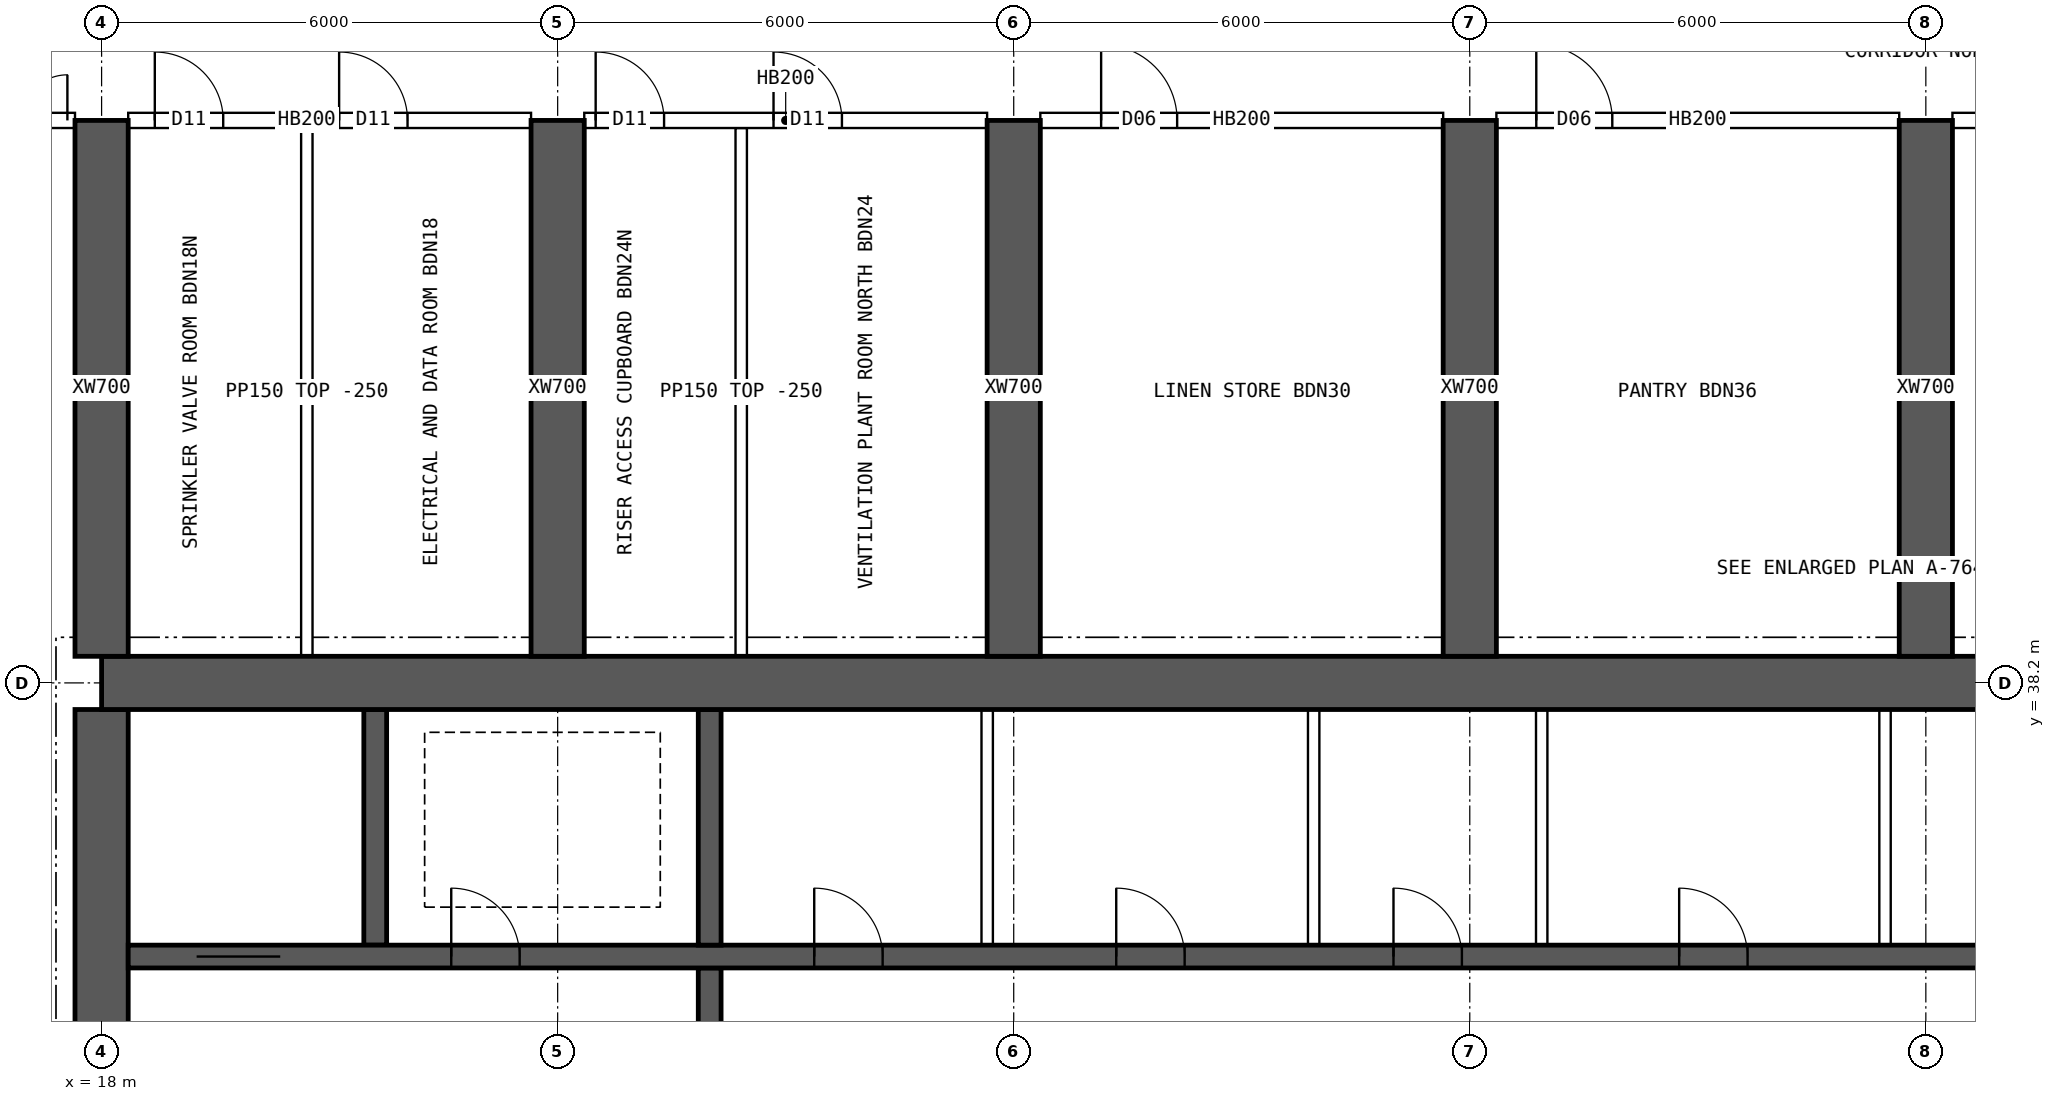
"""IFC4 building model, lengths in metres.
Left out: names, types, materials, properties, quantities, classifications, styles, units other than length and angle.
Written with IfcOpenShell. Run it as: python <this file> out.ifc"""

import sys

from ifc_helpers import new_model, si_unit, direction, frame, frame_2d, origin, place, context, subcontext, project, spatial, rectangle, extrude, element, fill, save


model = new_model("IFC4")
c1 = context("Model", 3, precision=1e-05, world=origin(), true_north=direction((0.0, 1.0)))
c2 = subcontext(c1, "Body", "Model", "MODEL_VIEW")
j1 = project(units=[si_unit("LENGTHUNIT", "METRE"), si_unit("PLANEANGLEUNIT", "RADIAN")], contexts=[c1])
p1 = place(None, origin())
s1 = spatial("IfcSite", under=j1, at=p1, CompositionType="ELEMENT")
p2 = place(p1, origin())
s2 = spatial("IfcBuilding", under=s1, at=p2, CompositionType="ELEMENT")
p3 = place(p2, frame((0.0, 0.0, 246.55)))
s3 = spatial("IfcBuildingStorey", under=s2, at=p3, CompositionType="ELEMENT", Elevation=246.55)
p4 = place(p3, frame((18.0, 38.2, 0.0), z_axis=(0.0, 0.0, 1.0), x_axis=(1.0, 0.0, 0.0)))
e1 = element("IfcWall", 1, at=p4, inside=s3, PredefinedType="SHEAR", context=c2, shape_type="SweptSolid", body=[
    extrude(rectangle(XDim=48.0, YDim=0.7, at=frame_2d((24.0, 0.0))), origin(), (0.0, 0.0, 1.0), 3.75),
])
p5 = place(p3, frame((18.0, 26.15, 0.0), z_axis=(0.0, 0.0, 1.0), x_axis=(0.0, 1.0, 0.0)))
e2 = element("IfcWall", 2, at=p5, inside=s3, PredefinedType="SHEAR", context=c2, shape_type="SweptSolid", body=[
    extrude(rectangle(XDim=11.7, YDim=0.7, at=frame_2d((5.85, 0.0))), origin(), (0.0, 0.0, 1.0), 3.75),
])
p6 = place(p5, frame((5.15, 0.0, 0.0)))
e3 = element("IfcOpeningElement", 3, at=p6, cuts=e2, PredefinedType="OPENING", context=c2, shape_type="SweptSolid", body=[
    extrude(rectangle(XDim=1.2, YDim=2.1, at=frame_2d((0.6, 1.05))), frame((0.0, 0.36, 0.0), z_axis=(0.0, -1.0, 0.0), x_axis=(1.0, 0.0, 0.0)), (0.0, 0.0, 1.0), 0.72),
])
p7 = place(p3, frame((18.35, 34.6, 0.0), z_axis=(0.0, 0.0, 1.0), x_axis=(1.0, 0.0, 0.0)))
e4 = element("IfcWall", 4, at=p7, inside=s3, PredefinedType="SHEAR", context=c2, shape_type="SweptSolid", body=[
    extrude(rectangle(XDim=47.3, YDim=0.3, at=frame_2d((23.65, 0.0))), origin(), (0.0, 0.0, 1.0), 3.75),
])
p8 = place(p7, frame((0.9, 0.0, 0.0)))
e5 = element("IfcOpeningElement", 5, at=p8, cuts=e4, PredefinedType="OPENING", context=c2, shape_type="SweptSolid", body=[
    extrude(rectangle(XDim=1.1, YDim=2.1, at=frame_2d((0.55, 1.05))), frame((0.0, 0.16, 0.0), z_axis=(0.0, -1.0, 0.0), x_axis=(1.0, 0.0, 0.0)), (0.0, 0.0, 1.0), 0.32),
])
p9 = place(p7, frame((45.3, 0.0, 0.0)))
e6 = element("IfcOpeningElement", 6, at=p9, cuts=e4, PredefinedType="OPENING", context=c2, shape_type="SweptSolid", body=[
    extrude(rectangle(XDim=1.1, YDim=2.1, at=frame_2d((0.55, 1.05))), frame((0.0, 0.16, 0.0), z_axis=(0.0, -1.0, 0.0), x_axis=(1.0, 0.0, 0.0)), (0.0, 0.0, 1.0), 0.32),
])
p10 = place(p7, frame((4.25, 0.0, 0.0)))
e7 = element("IfcOpeningElement", 7, at=p10, cuts=e4, PredefinedType="OPENING", context=c2, shape_type="SweptSolid", body=[
    extrude(rectangle(XDim=0.9, YDim=2.1, at=frame_2d((0.45, 1.05))), frame((0.0, 0.16, 0.0), z_axis=(0.0, -1.0, 0.0), x_axis=(1.0, 0.0, 0.0)), (0.0, 0.0, 1.0), 0.32),
])
p11 = place(p7, frame((42.15, 0.0, 0.0)))
e8 = element("IfcOpeningElement", 8, at=p11, cuts=e4, PredefinedType="OPENING", context=c2, shape_type="SweptSolid", body=[
    extrude(rectangle(XDim=0.9, YDim=2.1, at=frame_2d((0.45, 1.05))), frame((0.0, 0.16, 0.0), z_axis=(0.0, -1.0, 0.0), x_axis=(1.0, 0.0, 0.0)), (0.0, 0.0, 1.0), 0.32),
])
p12 = place(p7, frame((9.025, 0.0, 0.0)))
e9 = element("IfcOpeningElement", 9, at=p12, cuts=e4, PredefinedType="OPENING", context=c2, shape_type="SweptSolid", body=[
    extrude(rectangle(XDim=0.9, YDim=2.1, at=frame_2d((0.45, 1.05))), frame((0.0, 0.16, 0.0), z_axis=(0.0, -1.0, 0.0), x_axis=(1.0, 0.0, 0.0)), (0.0, 0.0, 1.0), 0.32),
])
p13 = place(p7, frame((12.999, 0.0, 0.0)))
e10 = element("IfcOpeningElement", 10, at=p13, cuts=e4, PredefinedType="OPENING", context=c2, shape_type="SweptSolid", body=[
    extrude(rectangle(XDim=0.9, YDim=2.1, at=frame_2d((0.45, 1.05))), frame((0.0, 0.16, 0.0), z_axis=(0.0, -1.0, 0.0), x_axis=(1.0, 0.0, 0.0)), (0.0, 0.0, 1.0), 0.32),
])
p14 = place(p7, frame((16.646, 0.0, 0.0)))
e11 = element("IfcOpeningElement", 11, at=p14, cuts=e4, PredefinedType="OPENING", context=c2, shape_type="SweptSolid", body=[
    extrude(rectangle(XDim=0.9, YDim=2.1, at=frame_2d((0.45, 1.05))), frame((0.0, 0.16, 0.0), z_axis=(0.0, -1.0, 0.0), x_axis=(1.0, 0.0, 0.0)), (0.0, 0.0, 1.0), 0.32),
])
p15 = place(p7, frame((20.405, 0.0, 0.0)))
e12 = element("IfcOpeningElement", 12, at=p15, cuts=e4, PredefinedType="OPENING", context=c2, shape_type="SweptSolid", body=[
    extrude(rectangle(XDim=0.9, YDim=2.1, at=frame_2d((0.45, 1.05))), frame((0.0, 0.16, 0.0), z_axis=(0.0, -1.0, 0.0), x_axis=(1.0, 0.0, 0.0)), (0.0, 0.0, 1.0), 0.32),
])
p16 = place(p7, frame((24.811, 0.0, 0.0)))
e13 = element("IfcOpeningElement", 13, at=p16, cuts=e4, PredefinedType="OPENING", context=c2, shape_type="SweptSolid", body=[
    extrude(rectangle(XDim=0.9, YDim=2.1, at=frame_2d((0.45, 1.05))), frame((0.0, 0.16, 0.0), z_axis=(0.0, -1.0, 0.0), x_axis=(1.0, 0.0, 0.0)), (0.0, 0.0, 1.0), 0.32),
])
p17 = place(p7, frame((27.608, 0.0, 0.0)))
e14 = element("IfcOpeningElement", 14, at=p17, cuts=e4, PredefinedType="OPENING", context=c2, shape_type="SweptSolid", body=[
    extrude(rectangle(XDim=0.9, YDim=2.1, at=frame_2d((0.45, 1.05))), frame((0.0, 0.16, 0.0), z_axis=(0.0, -1.0, 0.0), x_axis=(1.0, 0.0, 0.0)), (0.0, 0.0, 1.0), 0.32),
])
p18 = place(p7, frame((29.778, 0.0, 0.0)))
e15 = element("IfcOpeningElement", 15, at=p18, cuts=e4, PredefinedType="OPENING", context=c2, shape_type="SweptSolid", body=[
    extrude(rectangle(XDim=0.9, YDim=2.1, at=frame_2d((0.45, 1.05))), frame((0.0, 0.16, 0.0), z_axis=(0.0, -1.0, 0.0), x_axis=(1.0, 0.0, 0.0)), (0.0, 0.0, 1.0), 0.32),
])
p19 = place(p7, frame((33.577, 0.0, 0.0)))
e16 = element("IfcOpeningElement", 16, at=p19, cuts=e4, PredefinedType="OPENING", context=c2, shape_type="SweptSolid", body=[
    extrude(rectangle(XDim=0.9, YDim=2.1, at=frame_2d((0.45, 1.05))), frame((0.0, 0.16, 0.0), z_axis=(0.0, -1.0, 0.0), x_axis=(1.0, 0.0, 0.0)), (0.0, 0.0, 1.0), 0.32),
])
p20 = place(p7, frame((37.528, 0.0, 0.0)))
e17 = element("IfcOpeningElement", 17, at=p20, cuts=e4, PredefinedType="OPENING", context=c2, shape_type="SweptSolid", body=[
    extrude(rectangle(XDim=0.9, YDim=2.1, at=frame_2d((0.45, 1.05))), frame((0.0, 0.16, 0.0), z_axis=(0.0, -1.0, 0.0), x_axis=(1.0, 0.0, 0.0)), (0.0, 0.0, 1.0), 0.32),
])
p21 = place(p3, frame((26.0, 30.55, 0.0), z_axis=(0.0, 0.0, 1.0), x_axis=(0.0, 1.0, 0.0)))
e18 = element("IfcWall", 18, at=p21, inside=s3, PredefinedType="SHEAR", context=c2, shape_type="SweptSolid", body=[
    extrude(rectangle(XDim=3.9, YDim=0.3, at=frame_2d((1.95, 0.0))), origin(), (0.0, 0.0, 1.0), 3.75),
])
p22 = place(p21, frame((1.4, 0.0, 0.0)))
e19 = element("IfcOpeningElement", 19, at=p22, cuts=e18, PredefinedType="OPENING", context=c2, shape_type="SweptSolid", body=[
    extrude(rectangle(XDim=1.2, YDim=2.1, at=frame_2d((0.6, 1.05))), frame((0.0, 0.16, 0.0), z_axis=(0.0, -1.0, 0.0), x_axis=(1.0, 0.0, 0.0)), (0.0, 0.0, 1.0), 0.32),
])
for number, where, z_axis, x_axis in (
    (20, (21.6, 34.75, 0.0), (0.0, 0.0, 1.0), (0.0, 1.0, 0.0)),
    (21, (26.0, 34.75, 0.0), (0.0, 0.0, 1.0), (0.0, 1.0, 0.0)),
):
    element("IfcWall", number, at=place(p3, frame(where, z_axis=z_axis, x_axis=x_axis)), inside=s3, PredefinedType="SHEAR", context=c2, shape_type="SweptSolid", body=[
        extrude(rectangle(XDim=3.1, YDim=0.3, at=frame_2d((1.55, 0.0))), origin(), (0.0, 0.0, 1.0), 3.75),
    ])
for number, where, z_axis, x_axis in (
    (22, (18.0, 38.55, 0.0), (0.0, 0.0, 1.0), (0.0, 1.0, 0.0)),
    (23, (24.0, 38.55, 0.0), (0.0, 0.0, 1.0), (0.0, 1.0, 0.0)),
    (24, (30.0, 38.55, 0.0), (0.0, 0.0, 1.0), (0.0, 1.0, 0.0)),
    (25, (36.0, 38.55, 0.0), (0.0, 0.0, 1.0), (0.0, 1.0, 0.0)),
    (26, (42.0, 38.55, 0.0), (0.0, 0.0, 1.0), (0.0, 1.0, 0.0)),
):
    element("IfcWall", number, at=place(p3, frame(where, z_axis=z_axis, x_axis=x_axis)), inside=s3, PredefinedType="SHEAR", context=c2, shape_type="SweptSolid", body=[
        extrude(rectangle(XDim=7.05, YDim=0.7, at=frame_2d((3.525, 0.0))), origin(), (0.0, 0.0, 1.0), 3.75),
    ])
for number, where, z_axis, x_axis in (
    (27, (29.651, 34.75, 0.0), (0.0, 0.0, 1.0), (0.0, 1.0, 0.0)),
    (28, (33.946, 34.75, 0.0), (0.0, 0.0, 1.0), (0.0, 1.0, 0.0)),
    (29, (36.946, 34.75, 0.0), (0.0, 0.0, 1.0), (0.0, 1.0, 0.0)),
    (30, (41.463, 34.75, 0.0), (0.0, 0.0, 1.0), (0.0, 1.0, 0.0)),
):
    element("IfcWall", number, at=place(p3, frame(where, z_axis=z_axis, x_axis=x_axis)), inside=s3, PredefinedType="SOLIDWALL", context=c2, shape_type="SweptSolid", body=[
        extrude(rectangle(XDim=3.1, YDim=0.15, at=frame_2d((1.55, 0.0))), origin(), (0.0, 0.0, 1.0), 3.5),
    ])
p23 = place(p3, frame((15.6, 45.6, 0.0), z_axis=(0.0, 0.0, 1.0), x_axis=(1.0, 0.0, 0.0)))
e31 = element("IfcWall", 31, at=p23, inside=s3, PredefinedType="SOLIDWALL", context=c2, shape_type="SweptSolid", body=[
    extrude(rectangle(XDim=2.05, YDim=0.2, at=frame_2d((1.025, 0.0))), origin(), (0.0, 0.0, 1.0), 3.5),
])
p24 = place(p23, frame((0.75, 0.0, 0.0)))
e32 = element("IfcOpeningElement", 32, at=p24, cuts=e31, PredefinedType="OPENING", context=c2, shape_type="SweptSolid", body=[
    extrude(rectangle(XDim=1.2, YDim=2.1, at=frame_2d((0.6, 1.05))), frame((0.0, 0.11, 0.0), z_axis=(0.0, -1.0, 0.0), x_axis=(1.0, 0.0, 0.0)), (0.0, 0.0, 1.0), 0.22),
])
p25 = place(p3, frame((18.35, 45.6, 0.0), z_axis=(0.0, 0.0, 1.0), x_axis=(1.0, 0.0, 0.0)))
e33 = element("IfcWall", 33, at=p25, inside=s3, PredefinedType="SOLIDWALL", context=c2, shape_type="SweptSolid", body=[
    extrude(rectangle(XDim=5.3, YDim=0.2, at=frame_2d((2.65, 0.0))), origin(), (0.0, 0.0, 1.0), 3.5),
])
p26 = place(p25, frame((0.35, 0.0, 0.0)))
e34 = element("IfcOpeningElement", 34, at=p26, cuts=e33, PredefinedType="OPENING", context=c2, shape_type="SweptSolid", body=[
    extrude(rectangle(XDim=0.9, YDim=2.1, at=frame_2d((0.45, 1.05))), frame((0.0, 0.11, 0.0), z_axis=(0.0, -1.0, 0.0), x_axis=(1.0, 0.0, 0.0)), (0.0, 0.0, 1.0), 0.22),
])
p27 = place(p25, frame((2.775, 0.0, 0.0)))
e35 = element("IfcOpeningElement", 35, at=p27, cuts=e33, PredefinedType="OPENING", context=c2, shape_type="SweptSolid", body=[
    extrude(rectangle(XDim=0.9, YDim=2.1, at=frame_2d((0.45, 1.05))), frame((0.0, 0.11, 0.0), z_axis=(0.0, -1.0, 0.0), x_axis=(1.0, 0.0, 0.0)), (0.0, 0.0, 1.0), 0.22),
])
p28 = place(p3, frame((24.35, 45.6, 0.0), z_axis=(0.0, 0.0, 1.0), x_axis=(1.0, 0.0, 0.0)))
e36 = element("IfcWall", 36, at=p28, inside=s3, PredefinedType="SOLIDWALL", context=c2, shape_type="SweptSolid", body=[
    extrude(rectangle(XDim=5.3, YDim=0.2, at=frame_2d((2.65, 0.0))), origin(), (0.0, 0.0, 1.0), 3.5),
])
p29 = place(p28, frame((0.15, 0.0, 0.0)))
e37 = element("IfcOpeningElement", 37, at=p29, cuts=e36, PredefinedType="OPENING", context=c2, shape_type="SweptSolid", body=[
    extrude(rectangle(XDim=0.9, YDim=2.1, at=frame_2d((0.45, 1.05))), frame((0.0, 0.11, 0.0), z_axis=(0.0, -1.0, 0.0), x_axis=(1.0, 0.0, 0.0)), (0.0, 0.0, 1.0), 0.22),
])
p30 = place(p28, frame((2.49, 0.0, 0.0)))
e38 = element("IfcOpeningElement", 38, at=p30, cuts=e36, PredefinedType="OPENING", context=c2, shape_type="SweptSolid", body=[
    extrude(rectangle(XDim=0.9, YDim=2.1, at=frame_2d((0.45, 1.05))), frame((0.0, 0.11, 0.0), z_axis=(0.0, -1.0, 0.0), x_axis=(1.0, 0.0, 0.0)), (0.0, 0.0, 1.0), 0.22),
])
p31 = place(p3, frame((30.35, 45.6, 0.0), z_axis=(0.0, 0.0, 1.0), x_axis=(1.0, 0.0, 0.0)))
e39 = element("IfcWall", 39, at=p31, inside=s3, PredefinedType="SOLIDWALL", context=c2, shape_type="SweptSolid", body=[
    extrude(rectangle(XDim=5.3, YDim=0.2, at=frame_2d((2.65, 0.0))), origin(), (0.0, 0.0, 1.0), 3.5),
])
p32 = place(p31, frame((0.8, 0.0, 0.0)))
e40 = element("IfcOpeningElement", 40, at=p32, cuts=e39, PredefinedType="OPENING", context=c2, shape_type="SweptSolid", body=[
    extrude(rectangle(XDim=1.0, YDim=2.1, at=frame_2d((0.5, 1.05))), frame((0.0, 0.11, 0.0), z_axis=(0.0, -1.0, 0.0), x_axis=(1.0, 0.0, 0.0)), (0.0, 0.0, 1.0), 0.22),
])
p33 = place(p3, frame((36.35, 45.6, 0.0), z_axis=(0.0, 0.0, 1.0), x_axis=(1.0, 0.0, 0.0)))
e41 = element("IfcWall", 41, at=p33, inside=s3, PredefinedType="SOLIDWALL", context=c2, shape_type="SweptSolid", body=[
    extrude(rectangle(XDim=5.3, YDim=0.2, at=frame_2d((2.65, 0.0))), origin(), (0.0, 0.0, 1.0), 3.5),
])
p34 = place(p33, frame((0.525, 0.0, 0.0)))
e42 = element("IfcOpeningElement", 42, at=p34, cuts=e41, PredefinedType="OPENING", context=c2, shape_type="SweptSolid", body=[
    extrude(rectangle(XDim=1.0, YDim=2.1, at=frame_2d((0.5, 1.05))), frame((0.0, 0.11, 0.0), z_axis=(0.0, -1.0, 0.0), x_axis=(1.0, 0.0, 0.0)), (0.0, 0.0, 1.0), 0.22),
])
p35 = place(p3, frame((42.35, 45.6, 0.0), z_axis=(0.0, 0.0, 1.0), x_axis=(1.0, 0.0, 0.0)))
e43 = element("IfcWall", 43, at=p35, inside=s3, PredefinedType="SOLIDWALL", context=c2, shape_type="SweptSolid", body=[
    extrude(rectangle(XDim=5.3, YDim=0.2, at=frame_2d((2.65, 0.0))), origin(), (0.0, 0.0, 1.0), 3.5),
])
p36 = place(p35, frame((0.8, 0.0, 0.0)))
e44 = element("IfcOpeningElement", 44, at=p36, cuts=e43, PredefinedType="OPENING", context=c2, shape_type="SweptSolid", body=[
    extrude(rectangle(XDim=1.0, YDim=2.1, at=frame_2d((0.5, 1.05))), frame((0.0, 0.11, 0.0), z_axis=(0.0, -1.0, 0.0), x_axis=(1.0, 0.0, 0.0)), (0.0, 0.0, 1.0), 0.22),
])
for number, where, z_axis, x_axis in (
    (45, (20.7, 38.55, 0.0), (0.0, 0.0, 1.0), (0.0, 1.0, 0.0)),
    (46, (26.415, 38.55, 0.0), (0.0, 0.0, 1.0), (0.0, 1.0, 0.0)),
):
    element("IfcWall", number, at=place(p3, frame(where, z_axis=z_axis, x_axis=x_axis)), inside=s3, PredefinedType="PARTITIONING", context=c2, shape_type="SweptSolid", body=[
        extrude(rectangle(XDim=6.95, YDim=0.15, at=frame_2d((3.475, 0.0))), origin(), (0.0, 0.0, 1.0), 3.5),
    ])
p37 = place(p8, origin())
e47 = element("IfcDoor", 47, at=p37, inside=s3, OperationType="DOUBLE_DOOR_SLIDING", PredefinedType="DOOR", context=c2, shape_type="SweptSolid", body=[
    extrude(rectangle(XDim=1.1, YDim=2.1, at=frame_2d((0.55, 1.05))), frame((0.0, 0.025, 0.0), z_axis=(0.0, -1.0, 0.0), x_axis=(1.0, 0.0, 0.0)), (0.0, 0.0, 1.0), 0.05),
])
fill(e5, e47)
p38 = place(p10, origin())
e48 = element("IfcDoor", 48, at=p38, inside=s3, OperationType="SINGLE_SWING_LEFT", PredefinedType="DOOR", context=c2, shape_type="SweptSolid", body=[
    extrude(rectangle(XDim=0.9, YDim=2.1, at=frame_2d((0.45, 1.05))), frame((0.0, 0.025, 0.0), z_axis=(0.0, -1.0, 0.0), x_axis=(1.0, 0.0, 0.0)), (0.0, 0.0, 1.0), 0.05),
])
fill(e7, e48)
p39 = place(p12, origin())
e49 = element("IfcDoor", 49, at=p39, inside=s3, OperationType="SINGLE_SWING_LEFT", PredefinedType="DOOR", context=c2, shape_type="SweptSolid", body=[
    extrude(rectangle(XDim=0.9, YDim=2.1, at=frame_2d((0.45, 1.05))), frame((0.0, 0.025, 0.0), z_axis=(0.0, -1.0, 0.0), x_axis=(1.0, 0.0, 0.0)), (0.0, 0.0, 1.0), 0.05),
])
fill(e9, e49)
p40 = place(p13, origin())
e50 = element("IfcDoor", 50, at=p40, inside=s3, OperationType="SINGLE_SWING_LEFT", PredefinedType="DOOR", context=c2, shape_type="SweptSolid", body=[
    extrude(rectangle(XDim=0.9, YDim=2.1, at=frame_2d((0.45, 1.05))), frame((0.0, 0.025, 0.0), z_axis=(0.0, -1.0, 0.0), x_axis=(1.0, 0.0, 0.0)), (0.0, 0.0, 1.0), 0.05),
])
fill(e10, e50)
p41 = place(p14, origin())
e51 = element("IfcDoor", 51, at=p41, inside=s3, OperationType="SINGLE_SWING_LEFT", PredefinedType="DOOR", context=c2, shape_type="SweptSolid", body=[
    extrude(rectangle(XDim=0.9, YDim=2.1, at=frame_2d((0.45, 1.05))), frame((0.0, 0.025, 0.0), z_axis=(0.0, -1.0, 0.0), x_axis=(1.0, 0.0, 0.0)), (0.0, 0.0, 1.0), 0.05),
])
fill(e11, e51)
p42 = place(p15, origin())
e52 = element("IfcDoor", 52, at=p42, inside=s3, OperationType="SINGLE_SWING_LEFT", PredefinedType="DOOR", context=c2, shape_type="SweptSolid", body=[
    extrude(rectangle(XDim=0.9, YDim=2.1, at=frame_2d((0.45, 1.05))), frame((0.0, 0.025, 0.0), z_axis=(0.0, -1.0, 0.0), x_axis=(1.0, 0.0, 0.0)), (0.0, 0.0, 1.0), 0.05),
])
fill(e12, e52)
p43 = place(p24, origin())
e53 = element("IfcDoor", 53, at=p43, inside=s3, OperationType="DOUBLE_DOOR_SINGLE_SWING", PredefinedType="DOOR", context=c2, shape_type="SweptSolid", body=[
    extrude(rectangle(XDim=1.2, YDim=2.1, at=frame_2d((0.6, 1.05))), frame((0.0, 0.025, 0.0), z_axis=(0.0, -1.0, 0.0), x_axis=(1.0, 0.0, 0.0)), (0.0, 0.0, 1.0), 0.05),
])
fill(e32, e53)
p44 = place(p26, origin())
e54 = element("IfcDoor", 54, at=p44, inside=s3, OperationType="SINGLE_SWING_LEFT", PredefinedType="DOOR", context=c2, shape_type="SweptSolid", body=[
    extrude(rectangle(XDim=0.9, YDim=2.1, at=frame_2d((0.45, 1.05))), frame((0.0, 0.025, 0.0), z_axis=(0.0, -1.0, 0.0), x_axis=(1.0, 0.0, 0.0)), (0.0, 0.0, 1.0), 0.05),
])
fill(e34, e54)
p45 = place(p27, origin())
e55 = element("IfcDoor", 55, at=p45, inside=s3, OperationType="SINGLE_SWING_LEFT", PredefinedType="DOOR", context=c2, shape_type="SweptSolid", body=[
    extrude(rectangle(XDim=0.9, YDim=2.1, at=frame_2d((0.45, 1.05))), frame((0.0, 0.025, 0.0), z_axis=(0.0, -1.0, 0.0), x_axis=(1.0, 0.0, 0.0)), (0.0, 0.0, 1.0), 0.05),
])
fill(e35, e55)
p46 = place(p29, origin())
e56 = element("IfcDoor", 56, at=p46, inside=s3, OperationType="SINGLE_SWING_LEFT", PredefinedType="DOOR", context=c2, shape_type="SweptSolid", body=[
    extrude(rectangle(XDim=0.9, YDim=2.1, at=frame_2d((0.45, 1.05))), frame((0.0, 0.025, 0.0), z_axis=(0.0, -1.0, 0.0), x_axis=(1.0, 0.0, 0.0)), (0.0, 0.0, 1.0), 0.05),
])
fill(e37, e56)
p47 = place(p30, origin())
e57 = element("IfcDoor", 57, at=p47, inside=s3, OperationType="SINGLE_SWING_LEFT", PredefinedType="DOOR", context=c2, shape_type="SweptSolid", body=[
    extrude(rectangle(XDim=0.9, YDim=2.1, at=frame_2d((0.45, 1.05))), frame((0.0, 0.025, 0.0), z_axis=(0.0, -1.0, 0.0), x_axis=(1.0, 0.0, 0.0)), (0.0, 0.0, 1.0), 0.05),
])
fill(e38, e57)
p48 = place(p32, origin())
e58 = element("IfcDoor", 58, at=p48, inside=s3, OperationType="SINGLE_SWING_LEFT", PredefinedType="DOOR", context=c2, shape_type="SweptSolid", body=[
    extrude(rectangle(XDim=1.0, YDim=2.1, at=frame_2d((0.5, 1.05))), frame((0.0, 0.025, 0.0), z_axis=(0.0, -1.0, 0.0), x_axis=(1.0, 0.0, 0.0)), (0.0, 0.0, 1.0), 0.05),
])
fill(e40, e58)
p49 = place(p34, origin())
e59 = element("IfcDoor", 59, at=p49, inside=s3, OperationType="SINGLE_SWING_LEFT", PredefinedType="DOOR", context=c2, shape_type="SweptSolid", body=[
    extrude(rectangle(XDim=1.0, YDim=2.1, at=frame_2d((0.5, 1.05))), frame((0.0, 0.025, 0.0), z_axis=(0.0, -1.0, 0.0), x_axis=(1.0, 0.0, 0.0)), (0.0, 0.0, 1.0), 0.05),
])
fill(e42, e59)
save(model, sys.argv[1])
